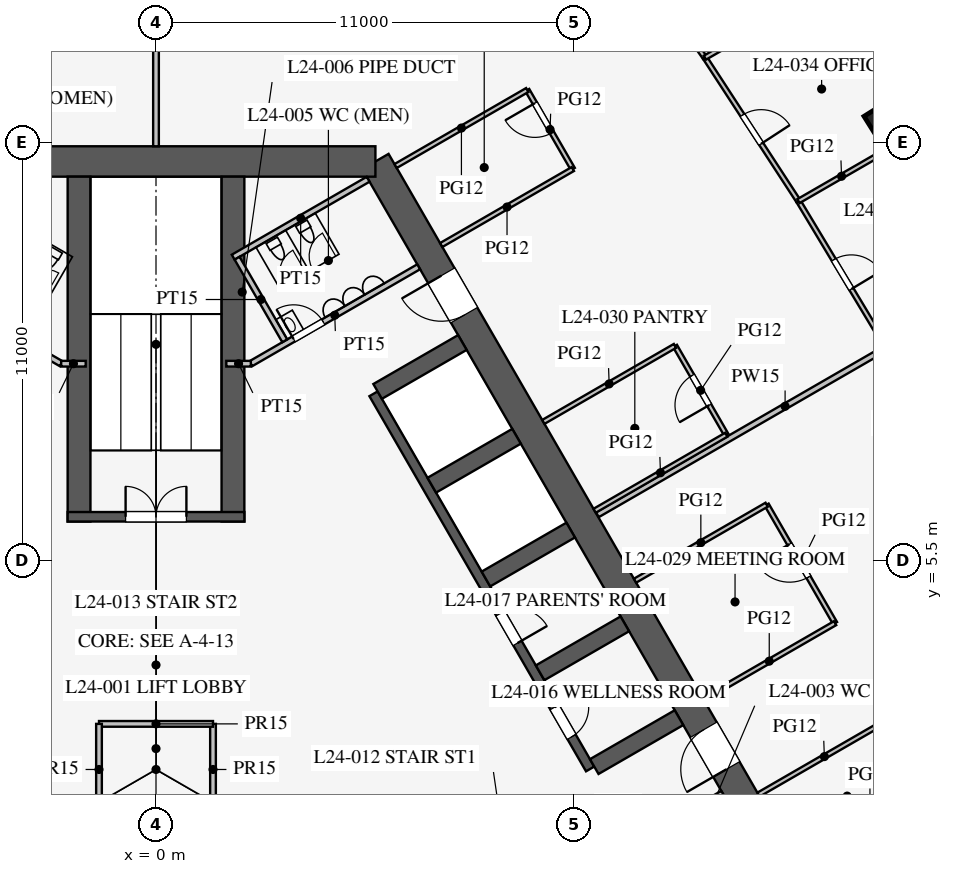
"""IFC4 building model, lengths in metres.
Left out: names, types, materials, properties, quantities, classifications, styles, units other than length and angle.
Written with IfcOpenShell. Run it as: python <this file> out.ifc"""

import sys

from ifc_helpers import new_model, si_unit, direction, frame, frame_2d, origin, origin_2d, place, context, subcontext, project, spatial, rectangle, extrude, element, fill, save


model = new_model("IFC4")
c1 = context("Model", 3, precision=1e-05, world=origin(), true_north=direction((0.0, 1.0)))
c2 = subcontext(c1, "Body", "Model", "MODEL_VIEW")
j1 = project(units=[si_unit("LENGTHUNIT", "METRE"), si_unit("PLANEANGLEUNIT", "RADIAN")], contexts=[c1])
p1 = place(None, origin())
s1 = spatial("IfcSite", under=j1, at=p1, CompositionType="ELEMENT")
p2 = place(p1, origin())
s2 = spatial("IfcBuilding", under=s1, at=p2, CompositionType="ELEMENT")
p3 = place(p2, frame((0.0, 0.0, 107.3)))
s3 = spatial("IfcBuildingStorey", under=s2, at=p3, CompositionType="ELEMENT", Elevation=107.3)
p4 = place(p3, frame((19.893, 16.681, 0.0), z_axis=(0.0, 0.0, 1.0), x_axis=(-0.530893337283, 0.84743864936, 0.0)))
e1 = element("IfcColumn", 1, at=p4, inside=s3, PredefinedType="COLUMN", context=c2, shape_type="SweptSolid", body=[
    extrude(rectangle(XDim=2.2, YDim=1.6, at=origin_2d()), origin(), (0.0, 0.0, 1.0), 4.2),
])
p5 = place(p3, frame((16.743, -3.0, 0.0), z_axis=(0.0, 0.0, 1.0), x_axis=(-0.500002442456, 0.866023993627, 0.0)))
e2 = element("IfcWall", 2, at=p5, inside=s3, PredefinedType="SHEAR", context=c2, shape_type="SweptSolid", body=[
    extrude(rectangle(XDim=21.939, YDim=0.8, at=frame_2d((10.97, 0.0))), origin(), (0.0, 0.0, 1.0), 4.2),
])
p6 = place(p5, frame((17.27, 0.0, 0.0)))
e3 = element("IfcOpeningElement", 3, at=p6, cuts=e2, PredefinedType="OPENING", context=c2, shape_type="SweptSolid", body=[
    extrude(rectangle(XDim=1.2, YDim=2.1, at=frame_2d((0.6, 1.05))), frame((0.0, 0.41, 0.0), z_axis=(0.0, -1.0, 0.0), x_axis=(1.0, 0.0, 0.0)), (0.0, 0.0, 1.0), 0.82),
])
p7 = place(p5, frame((3.47, 0.0, 0.0)))
e4 = element("IfcOpeningElement", 4, at=p7, cuts=e2, PredefinedType="OPENING", context=c2, shape_type="SweptSolid", body=[
    extrude(rectangle(XDim=1.2, YDim=2.1, at=frame_2d((0.6, 1.05))), frame((0.0, 0.41, 0.0), z_axis=(0.0, -1.0, 0.0), x_axis=(1.0, 0.0, 0.0)), (0.0, 0.0, 1.0), 0.82),
])
p8 = place(p3, frame((5.773, 16.0, 0.0), z_axis=(0.0, 0.0, 1.0), x_axis=(-1.0, 0.0, 0.0)))
e5 = element("IfcWall", 5, at=p8, inside=s3, PredefinedType="SHEAR", context=c2, shape_type="SweptSolid", body=[
    extrude(rectangle(XDim=11.547, YDim=0.8, at=frame_2d((5.773, 0.0))), origin(), (0.0, 0.0, 1.0), 4.2),
])
p9 = place(p3, frame((11.424, 0.014, 0.0), z_axis=(0.0, 0.0, 1.0), x_axis=(-0.500001763848, 0.866024385424, 0.0)))
e6 = element("IfcWall", 6, at=p9, inside=s3, PredefinedType="SHEAR", context=c2, shape_type="SweptSolid", body=[
    extrude(rectangle(XDim=11.4, YDim=0.25, at=frame_2d((5.7, 0.0))), origin(), (0.0, 0.0, 1.0), 4.2),
])
p10 = place(p9, frame((0.975, 0.0, 0.0)))
e7 = element("IfcOpeningElement", 7, at=p10, cuts=e6, PredefinedType="OPENING", context=c2, shape_type="SweptSolid", body=[
    extrude(rectangle(XDim=0.9, YDim=2.1, at=frame_2d((0.45, 1.05))), frame((0.0, 0.135, 0.0), z_axis=(0.0, -1.0, 0.0), x_axis=(1.0, 0.0, 0.0)), (0.0, 0.0, 1.0), 0.27),
])
p11 = place(p9, frame((3.825, 0.0, 0.0)))
e8 = element("IfcOpeningElement", 8, at=p11, cuts=e6, PredefinedType="OPENING", context=c2, shape_type="SweptSolid", body=[
    extrude(rectangle(XDim=0.9, YDim=2.1, at=frame_2d((0.45, 1.05))), frame((0.0, 0.135, 0.0), z_axis=(0.0, -1.0, 0.0), x_axis=(1.0, 0.0, 0.0)), (0.0, 0.0, 1.0), 0.27),
])
for number, where, z_axis, x_axis in (
    (9, (11.532, 0.076, 0.0), (0.0, 0.0, 1.0), (0.866, 0.5, 0.0)),
    (10, (10.107, 2.544, 0.0), (0.0, 0.0, 1.0), (0.866, 0.5, 0.0)),
    (11, (8.682, 5.012, 0.0), (0.0, 0.0, 1.0), (0.866, 0.5, 0.0)),
    (12, (7.257, 7.481, 0.0), (0.0, 0.0, 1.0), (0.866, 0.5, 0.0)),
):
    element("IfcWall", number, at=place(p3, frame(where, z_axis=z_axis, x_axis=x_axis)), inside=s3, PredefinedType="SHEAR", context=c2, shape_type="SweptSolid", body=[
        extrude(rectangle(XDim=2.575, YDim=0.45, at=frame_2d((1.288, 0.0))), origin(), (0.0, 0.0, 1.0), 4.2),
    ])
p12 = place(p3, frame((5.832, 9.949, 0.0), z_axis=(0.0, 0.0, 1.0), x_axis=(0.866029291668, 0.499993265928, 0.0)))
e13 = element("IfcWall", 13, at=p12, inside=s3, PredefinedType="SHEAR", context=c2, shape_type="SweptSolid", body=[
    extrude(rectangle(XDim=2.575, YDim=0.45, at=frame_2d((1.288, 0.0))), origin(), (0.0, 0.0, 1.0), 4.2),
])
for number, where, z_axis, x_axis in (
    (14, (2.025, 6.525, 0.0), (0.0, 0.0, 1.0), (0.0, 1.0, 0.0)),
    (15, (-2.025, 6.525, 0.0), (0.0, 0.0, 1.0), (0.0, 1.0, 0.0)),
):
    element("IfcWall", number, at=place(p3, frame(where, z_axis=z_axis, x_axis=x_axis)), inside=s3, PredefinedType="SHEAR", context=c2, shape_type="SweptSolid", body=[
        extrude(rectangle(XDim=9.075, YDim=0.6, at=frame_2d((4.538, 0.0))), origin(), (0.0, 0.0, 1.0), 4.2),
    ])
p13 = place(p3, frame((2.325, 6.65, 0.0), z_axis=(0.0, 0.0, 1.0), x_axis=(-1.0, 0.0, 0.0)))
e16 = element("IfcWall", 16, at=p13, inside=s3, PredefinedType="SHEAR", context=c2, shape_type="SweptSolid", body=[
    extrude(rectangle(XDim=4.65, YDim=0.25, at=frame_2d((2.325, 0.0))), origin(), (0.0, 0.0, 1.0), 4.2),
])
p14 = place(p13, frame((1.525, 0.0, 0.0)))
e17 = element("IfcOpeningElement", 17, at=p14, cuts=e16, PredefinedType="OPENING", context=c2, shape_type="SweptSolid", body=[
    extrude(rectangle(XDim=1.6, YDim=2.1, at=frame_2d((0.8, 1.05))), frame((0.0, 0.135, 0.0), z_axis=(0.0, -1.0, 0.0), x_axis=(1.0, 0.0, 0.0)), (0.0, 0.0, 1.0), 0.27),
])
p15 = place(p3, frame((2.495, 10.678, 0.0), z_axis=(0.0, 0.0, 1.0), x_axis=(0.86602216432, 0.500005610874, 0.0)))
e18 = element("IfcWall", 18, at=p15, inside=s3, PredefinedType="PARTITIONING", context=c2, shape_type="SweptSolid", body=[
    extrude(rectangle(XDim=5.1, YDim=0.15, at=frame_2d((2.55, 0.0))), origin(), (0.0, 0.0, 1.0), 4.0),
])
p16 = place(p15, frame((1.3, 0.0, 0.0)))
e19 = element("IfcOpeningElement", 19, at=p16, cuts=e18, PredefinedType="OPENING", context=c2, shape_type="SweptSolid", body=[
    extrude(rectangle(XDim=0.9, YDim=2.1, at=frame_2d((0.45, 1.05))), frame((0.0, 0.085, 0.0), z_axis=(0.0, -1.0, 0.0), x_axis=(1.0, 0.0, 0.0)), (0.0, 0.0, 1.0), 0.17),
])
p17 = place(p3, frame((10.495, -3.178, 0.0), z_axis=(0.0, 0.0, 1.0), x_axis=(0.86602216432, 0.500005610874, 0.0)))
e20 = element("IfcWall", 20, at=p17, inside=s3, PredefinedType="PARTITIONING", context=c2, shape_type="SweptSolid", body=[
    extrude(rectangle(XDim=5.1, YDim=0.15, at=frame_2d((2.55, 0.0))), origin(), (0.0, 0.0, 1.0), 4.0),
])
p18 = place(p17, frame((2.6, 0.0, 0.0)))
e21 = element("IfcOpeningElement", 21, at=p18, cuts=e20, PredefinedType="OPENING", context=c2, shape_type="SweptSolid", body=[
    extrude(rectangle(XDim=0.9, YDim=2.1, at=frame_2d((0.45, 1.05))), frame((0.0, 0.085, 0.0), z_axis=(0.0, -1.0, 0.0), x_axis=(1.0, 0.0, 0.0)), (0.0, 0.0, 1.0), 0.17),
])
p19 = place(p3, frame((-2.495, 10.678, 0.0), z_axis=(0.0, 0.0, 1.0), x_axis=(-0.86602216432, 0.500005610874, 0.0)))
e22 = element("IfcWall", 22, at=p19, inside=s3, PredefinedType="PARTITIONING", context=c2, shape_type="SweptSolid", body=[
    extrude(rectangle(XDim=5.1, YDim=0.15, at=frame_2d((2.55, 0.0))), origin(), (0.0, 0.0, 1.0), 4.0),
])
p20 = place(p19, frame((2.6, 0.0, 0.0)))
e23 = element("IfcOpeningElement", 23, at=p20, cuts=e22, PredefinedType="OPENING", context=c2, shape_type="SweptSolid", body=[
    extrude(rectangle(XDim=0.9, YDim=2.1, at=frame_2d((0.45, 1.05))), frame((0.0, 0.085, 0.0), z_axis=(0.0, -1.0, 0.0), x_axis=(1.0, 0.0, 0.0)), (0.0, 0.0, 1.0), 0.17),
])
for number, where, z_axis, x_axis in (
    (24, (2.495, 10.678, 0.0), (0.0, 0.0, 1.0), (-1.0, 0.0, 0.0)),
    (25, (-2.495, 10.678, 0.0), (0.0, 0.0, 1.0), (1.0, 0.0, 0.0)),
):
    element("IfcWall", number, at=place(p3, frame(where, z_axis=z_axis, x_axis=x_axis)), inside=s3, PredefinedType="PARTITIONING", context=c2, shape_type="SweptSolid", body=[
        extrude(rectangle(XDim=0.645, YDim=0.15, at=frame_2d((0.323, 0.0))), origin(), (0.0, 0.0, 1.0), 4.0),
    ])
p21 = place(p3, frame((2.031, 13.482, 0.0), z_axis=(0.0, 0.0, 1.0), x_axis=(0.866050731258, 0.499956128963, 0.0)))
e26 = element("IfcWall", 26, at=p21, inside=s3, PredefinedType="PARTITIONING", context=c2, shape_type="SweptSolid", body=[
    extrude(rectangle(XDim=4.1, YDim=0.15, at=frame_2d((2.05, 0.0))), origin(), (0.0, 0.0, 1.0), 4.0),
])
p22 = place(p3, frame((3.389, 11.281, 0.0), z_axis=(0.0, 0.0, 1.0), x_axis=(-0.499989096993, 0.866031698547, 0.0)))
e27 = element("IfcWall", 27, at=p22, inside=s3, PredefinedType="PARTITIONING", context=c2, shape_type="SweptSolid", body=[
    extrude(rectangle(XDim=2.51, YDim=0.15, at=frame_2d((1.255, 0.0))), origin(), (0.0, 0.0, 1.0), 4.0),
])
p23 = place(p3, frame((1.5, -1.2, 0.0), z_axis=(0.0, 0.0, 1.0), x_axis=(0.0, 1.0, 0.0)))
e28 = element("IfcWall", 28, at=p23, inside=s3, PredefinedType="PARTITIONING", context=c2, shape_type="SweptSolid", body=[
    extrude(rectangle(XDim=2.4, YDim=0.15, at=frame_2d((1.2, 0.0))), origin(), (0.0, 0.0, 1.0), 4.0),
])
p24 = place(p3, frame((1.5, 1.2, 0.0), z_axis=(0.0, 0.0, 1.0), x_axis=(-1.0, 0.0, 0.0)))
e29 = element("IfcWall", 29, at=p24, inside=s3, PredefinedType="PARTITIONING", context=c2, shape_type="SweptSolid", body=[
    extrude(rectangle(XDim=3.0, YDim=0.15, at=frame_2d((1.5, 0.0))), origin(), (0.0, 0.0, 1.0), 4.0),
])
p25 = place(p3, frame((-1.5, 1.2, 0.0), z_axis=(0.0, 0.0, 1.0), x_axis=(0.0, -1.0, 0.0)))
e30 = element("IfcWall", 30, at=p25, inside=s3, PredefinedType="PARTITIONING", context=c2, shape_type="SweptSolid", body=[
    extrude(rectangle(XDim=2.4, YDim=0.15, at=frame_2d((1.2, 0.0))), origin(), (0.0, 0.0, 1.0), 4.0),
])
p26 = place(p3, frame((0.0, 16.4, 0.0), z_axis=(0.0, 0.0, 1.0), x_axis=(0.0, 1.0, 0.0)))
e31 = element("IfcWall", 31, at=p26, inside=s3, PredefinedType="PARTITIONING", context=c2, shape_type="SweptSolid", body=[
    extrude(rectangle(XDim=16.65, YDim=0.15, at=frame_2d((8.325, 0.0))), origin(), (0.0, 0.0, 1.0), 2.3),
])
p27 = place(p3, frame((11.613, 6.705, 0.0), z_axis=(0.0, 0.0, 1.0), x_axis=(0.866026306654, 0.499998436182, 0.0)))
e32 = element("IfcWall", 32, at=p27, inside=s3, PredefinedType="PARTITIONING", context=c2, shape_type="SweptSolid", body=[
    extrude(rectangle(XDim=11.41, YDim=0.15, at=frame_2d((5.705, 0.0))), origin(), (0.0, 0.0, 1.0), 2.8),
])
p28 = place(p3, frame((15.006, 8.808, 0.0), z_axis=(0.0, 0.0, 1.0), x_axis=(-0.500048589285, 0.86599734893, 0.0)))
e33 = element("IfcWall", 33, at=p28, inside=s3, PredefinedType="PARTITIONING", context=c2, shape_type="SweptSolid", body=[
    extrude(rectangle(XDim=2.7, YDim=0.12, at=frame_2d((1.35, 0.0))), origin(), (0.0, 0.0, 1.0), 2.9),
])
p29 = place(p28, frame((0.9, 0.0, 0.15)))
e34 = element("IfcOpeningElement", 34, at=p29, cuts=e33, PredefinedType="OPENING", context=c2, shape_type="SweptSolid", body=[
    extrude(rectangle(XDim=0.9, YDim=2.1, at=frame_2d((0.45, 1.05))), frame((0.0, 0.07, 0.0), z_axis=(0.0, -1.0, 0.0), x_axis=(1.0, 0.0, 0.0)), (0.0, 0.0, 1.0), 0.14),
])
p30 = place(p3, frame((10.969, 15.802, 0.0), z_axis=(0.0, 0.0, 1.0), x_axis=(-0.500001309137, 0.866024647952, 0.0)))
e35 = element("IfcWall", 35, at=p30, inside=s3, PredefinedType="PARTITIONING", context=c2, shape_type="SweptSolid", body=[
    extrude(rectangle(XDim=2.4, YDim=0.12, at=frame_2d((1.2, 0.0))), origin(), (0.0, 0.0, 1.0), 2.9),
])
p31 = place(p30, frame((1.1, 0.0, 0.15)))
e36 = element("IfcOpeningElement", 36, at=p31, cuts=e35, PredefinedType="OPENING", context=c2, shape_type="SweptSolid", body=[
    extrude(rectangle(XDim=0.9, YDim=2.1, at=frame_2d((0.45, 1.05))), frame((0.0, 0.07, 0.0), z_axis=(0.0, -1.0, 0.0), x_axis=(1.0, 0.0, 0.0)), (0.0, 0.0, 1.0), 0.14),
])
p32 = place(p3, frame((17.869, 3.85, 0.0), z_axis=(0.0, 0.0, 1.0), x_axis=(-0.500012057535, 0.866018442252, 0.0)))
e37 = element("IfcWall", 37, at=p32, inside=s3, PredefinedType="PARTITIONING", context=c2, shape_type="SweptSolid", body=[
    extrude(rectangle(XDim=3.6, YDim=0.12, at=frame_2d((1.8, 0.0))), origin(), (0.0, 0.0, 1.0), 2.9),
])
p33 = place(p32, frame((1.4, 0.0, 0.15)))
e38 = element("IfcOpeningElement", 38, at=p33, cuts=e37, PredefinedType="OPENING", context=c2, shape_type="SweptSolid", body=[
    extrude(rectangle(XDim=1.0, YDim=2.1, at=frame_2d((0.5, 1.05))), frame((0.0, 0.07, 0.0), z_axis=(0.0, -1.0, 0.0), x_axis=(1.0, 0.0, 0.0)), (0.0, 0.0, 1.0), 0.14),
])
p34 = place(p3, frame((11.542, 6.808, 0.0), z_axis=(0.0, 0.0, 1.0), x_axis=(0.866026010844, 0.49999894854, 0.0)))
e39 = element("IfcWall", 39, at=p34, inside=s3, PredefinedType="PARTITIONING", context=c2, shape_type="SweptSolid", body=[
    extrude(rectangle(XDim=4.0, YDim=0.12, at=frame_2d((2.0, 0.0))), origin(), (0.0, 0.0, 1.0), 2.8),
])
for number, where, z_axis, x_axis in (
    (40, (6.305, 15.88, 0.0), (0.0, 0.0, 1.0), (0.866, 0.5, 0.0)),
    (41, (10.192, 9.146, 0.0), (0.0, 0.0, 1.0), (0.866, 0.5, 0.0)),
    (42, (7.505, 13.802, 0.0), (0.0, 0.0, 1.0), (0.866, 0.5, 0.0)),
    (43, (12.605, 4.968, 0.0), (0.0, 0.0, 1.0), (0.866, 0.5, 0.0)),
    (44, (14.405, 1.85, 0.0), (0.0, 0.0, 1.0), (0.866, 0.5, 0.0)),
    (45, (15.855, -0.661, 0.0), (0.0, 0.0, 1.0), (0.866, 0.5, 0.0)),
):
    element("IfcWall", number, at=place(p3, frame(where, z_axis=z_axis, x_axis=x_axis)), inside=s3, PredefinedType="PARTITIONING", context=c2, shape_type="SweptSolid", body=[
        extrude(rectangle(XDim=4.0, YDim=0.12, at=frame_2d((2.0, 0.0))), origin(), (0.0, 0.0, 1.0), 2.9),
    ])
p35 = place(p3, frame((19.226, 11.1, 0.0), z_axis=(0.0, 0.0, 1.0), x_axis=(-0.515548366618, 0.856860479703, 0.0)))
e46 = element("IfcWall", 46, at=p35, inside=s3, PredefinedType="PARTITIONING", context=c2, shape_type="SweptSolid", body=[
    extrude(rectangle(XDim=4.501, YDim=0.12, at=frame_2d((2.25, 0.0))), origin(), (0.0, 0.0, 1.0), 2.9),
])
p36 = place(p35, frame((1.8, 0.0, 0.15)))
e47 = element("IfcOpeningElement", 47, at=p36, cuts=e46, PredefinedType="OPENING", context=c2, shape_type="SweptSolid", body=[
    extrude(rectangle(XDim=0.9, YDim=2.1, at=frame_2d((0.45, 1.05))), frame((0.0, 0.07, 0.0), z_axis=(0.0, -1.0, 0.0), x_axis=(1.0, 0.0, 0.0)), (0.0, 0.0, 1.0), 0.14),
])
p37 = place(p3, frame((16.905, 14.956, 0.0), z_axis=(0.0, 0.0, 1.0), x_axis=(-0.546069464151, 0.837739900161, 0.0)))
e48 = element("IfcWall", 48, at=p37, inside=s3, PredefinedType="PARTITIONING", context=c2, shape_type="SweptSolid", body=[
    extrude(rectangle(XDim=4.507, YDim=0.12, at=frame_2d((2.253, 0.0))), origin(), (0.0, 0.0, 1.0), 2.9),
])
p38 = place(p37, frame((1.8, 0.0, 0.15)))
e49 = element("IfcOpeningElement", 49, at=p38, cuts=e48, PredefinedType="OPENING", context=c2, shape_type="SweptSolid", body=[
    extrude(rectangle(XDim=0.9, YDim=2.1, at=frame_2d((0.45, 1.05))), frame((0.0, 0.07, 0.0), z_axis=(0.0, -1.0, 0.0), x_axis=(1.0, 0.0, 0.0)), (0.0, 0.0, 1.0), 0.14),
])
p39 = place(p3, frame((14.444, 18.732, 0.0), z_axis=(0.0, 0.0, 1.0), x_axis=(-0.576023283708, 0.817433285734, 0.0)))
e50 = element("IfcWall", 50, at=p39, inside=s3, PredefinedType="PARTITIONING", context=c2, shape_type="SweptSolid", body=[
    extrude(rectangle(XDim=4.519, YDim=0.12, at=frame_2d((2.259, 0.0))), origin(), (0.0, 0.0, 1.0), 2.9),
])
p40 = place(p39, frame((1.8, 0.0, 0.15)))
e51 = element("IfcOpeningElement", 51, at=p40, cuts=e50, PredefinedType="OPENING", context=c2, shape_type="SweptSolid", body=[
    extrude(rectangle(XDim=0.9, YDim=2.1, at=frame_2d((0.45, 1.05))), frame((0.0, 0.07, 0.0), z_axis=(0.0, -1.0, 0.0), x_axis=(1.0, 0.0, 0.0)), (0.0, 0.0, 1.0), 0.14),
])
p41 = place(p3, frame((16.905, 14.956, 0.0), z_axis=(0.0, 0.0, 1.0), x_axis=(0.866008611403, 0.50002908413, 0.0)))
e52 = element("IfcWall", 52, at=p41, inside=s3, PredefinedType="PARTITIONING", context=c2, shape_type="SweptSolid", body=[
    extrude(rectangle(XDim=2.619, YDim=0.12, at=frame_2d((1.31, 0.0))), origin(), (0.0, 0.0, 1.0), 2.8),
])
p42 = place(p3, frame((14.444, 18.732, 0.0), z_axis=(0.0, 0.0, 1.0), x_axis=(0.866011491631, 0.500024095782, 0.0)))
e53 = element("IfcWall", 53, at=p42, inside=s3, PredefinedType="PARTITIONING", context=c2, shape_type="SweptSolid", body=[
    extrude(rectangle(XDim=2.615, YDim=0.12, at=frame_2d((1.308, 0.0))), origin(), (0.0, 0.0, 1.0), 2.9),
])
p43 = place(p16, origin())
e54 = element("IfcDoor", 54, at=p43, inside=s3, OperationType="SINGLE_SWING_LEFT", PredefinedType="DOOR", context=c2, shape_type="SweptSolid", body=[
    extrude(rectangle(XDim=0.9, YDim=2.1, at=frame_2d((0.45, 1.05))), frame((0.0, 0.025, 0.0), z_axis=(0.0, -1.0, 0.0), x_axis=(1.0, 0.0, 0.0)), (0.0, 0.0, 1.0), 0.05),
])
fill(e19, e54)
p44 = place(p14, frame((1.6, 0.0, 0.0), z_axis=(0.0, 0.0, 1.0), x_axis=(-1.0, 0.0, 0.0)))
e55 = element("IfcDoor", 55, at=p44, inside=s3, OperationType="DOUBLE_DOOR_SINGLE_SWING", PredefinedType="DOOR", context=c2, shape_type="SweptSolid", body=[
    extrude(rectangle(XDim=1.6, YDim=2.1, at=frame_2d((0.8, 1.05))), frame((0.0, 0.025, 0.0), z_axis=(0.0, -1.0, 0.0), x_axis=(1.0, 0.0, 0.0)), (0.0, 0.0, 1.0), 0.05),
])
fill(e17, e55)
p45 = place(p6, origin())
e56 = element("IfcDoor", 56, at=p45, inside=s3, OperationType="SINGLE_SWING_RIGHT", PredefinedType="DOOR", context=c2, shape_type="SweptSolid", body=[
    extrude(rectangle(XDim=1.2, YDim=2.1, at=frame_2d((0.6, 1.05))), frame((0.0, 0.025, 0.0), z_axis=(0.0, -1.0, 0.0), x_axis=(1.0, 0.0, 0.0)), (0.0, 0.0, 1.0), 0.05),
])
fill(e3, e56)
p46 = place(p7, origin())
e57 = element("IfcDoor", 57, at=p46, inside=s3, OperationType="SINGLE_SWING_LEFT", PredefinedType="DOOR", context=c2, shape_type="SweptSolid", body=[
    extrude(rectangle(XDim=1.2, YDim=2.1, at=frame_2d((0.6, 1.05))), frame((0.0, 0.025, 0.0), z_axis=(0.0, -1.0, 0.0), x_axis=(1.0, 0.0, 0.0)), (0.0, 0.0, 1.0), 0.05),
])
fill(e4, e57)
p47 = place(p10, frame((0.9, 0.0, 0.0), z_axis=(0.0, 0.0, 1.0), x_axis=(-1.0, 0.0, 0.0)))
e58 = element("IfcDoor", 58, at=p47, inside=s3, OperationType="SINGLE_SWING_LEFT", PredefinedType="DOOR", context=c2, shape_type="SweptSolid", body=[
    extrude(rectangle(XDim=0.9, YDim=2.1, at=frame_2d((0.45, 1.05))), frame((0.0, 0.025, 0.0), z_axis=(0.0, -1.0, 0.0), x_axis=(1.0, 0.0, 0.0)), (0.0, 0.0, 1.0), 0.05),
])
fill(e7, e58)
p48 = place(p11, frame((0.9, 0.0, 0.0), z_axis=(0.0, 0.0, 1.0), x_axis=(-1.0, 0.0, 0.0)))
e59 = element("IfcDoor", 59, at=p48, inside=s3, OperationType="SINGLE_SWING_RIGHT", PredefinedType="DOOR", context=c2, shape_type="SweptSolid", body=[
    extrude(rectangle(XDim=0.9, YDim=2.1, at=frame_2d((0.45, 1.05))), frame((0.0, 0.025, 0.0), z_axis=(0.0, -1.0, 0.0), x_axis=(1.0, 0.0, 0.0)), (0.0, 0.0, 1.0), 0.05),
])
fill(e8, e59)
p49 = place(p33, origin())
e60 = element("IfcDoor", 60, at=p49, inside=s3, OperationType="SINGLE_SWING_RIGHT", PredefinedType="DOOR", context=c2, shape_type="SweptSolid", body=[
    extrude(rectangle(XDim=1.0, YDim=2.1, at=frame_2d((0.5, 1.05))), frame((0.0, 0.025, 0.0), z_axis=(0.0, -1.0, 0.0), x_axis=(1.0, 0.0, 0.0)), (0.0, 0.0, 1.0), 0.05),
])
fill(e38, e60)
p50 = place(p29, origin())
e61 = element("IfcDoor", 61, at=p50, inside=s3, OperationType="SINGLE_SWING_LEFT", PredefinedType="DOOR", context=c2, shape_type="SweptSolid", body=[
    extrude(rectangle(XDim=0.9, YDim=2.1, at=frame_2d((0.45, 1.05))), frame((0.0, 0.025, 0.0), z_axis=(0.0, -1.0, 0.0), x_axis=(1.0, 0.0, 0.0)), (0.0, 0.0, 1.0), 0.05),
])
fill(e34, e61)
p51 = place(p31, origin())
e62 = element("IfcDoor", 62, at=p51, inside=s3, OperationType="SINGLE_SWING_RIGHT", PredefinedType="DOOR", context=c2, shape_type="SweptSolid", body=[
    extrude(rectangle(XDim=0.9, YDim=2.1, at=frame_2d((0.45, 1.05))), frame((0.0, 0.025, 0.0), z_axis=(0.0, -1.0, 0.0), x_axis=(1.0, 0.0, 0.0)), (0.0, 0.0, 1.0), 0.05),
])
fill(e36, e62)
p52 = place(p38, frame((0.9, 0.0, 0.0), z_axis=(0.0, 0.0, 1.0), x_axis=(-1.0, 0.0, 0.0)))
e63 = element("IfcDoor", 63, at=p52, inside=s3, OperationType="SINGLE_SWING_RIGHT", PredefinedType="DOOR", context=c2, shape_type="SweptSolid", body=[
    extrude(rectangle(XDim=0.9, YDim=2.1, at=frame_2d((0.45, 1.05))), frame((0.0, 0.025, 0.0), z_axis=(0.0, -1.0, 0.0), x_axis=(1.0, 0.0, 0.0)), (0.0, 0.0, 1.0), 0.05),
])
fill(e49, e63)
p53 = place(p36, frame((0.9, 0.0, 0.0), z_axis=(0.0, 0.0, 1.0), x_axis=(-1.0, 0.0, 0.0)))
e64 = element("IfcDoor", 64, at=p53, inside=s3, OperationType="SINGLE_SWING_RIGHT", PredefinedType="DOOR", context=c2, shape_type="SweptSolid", body=[
    extrude(rectangle(XDim=0.9, YDim=2.1, at=frame_2d((0.45, 1.05))), frame((0.0, 0.025, 0.0), z_axis=(0.0, -1.0, 0.0), x_axis=(1.0, 0.0, 0.0)), (0.0, 0.0, 1.0), 0.05),
])
fill(e47, e64)
save(model, sys.argv[1])
